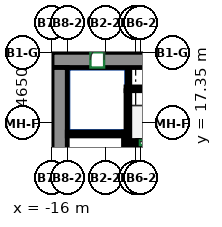
"""IFC4 building model, lengths in metres.
Left out: names, types, materials, properties, quantities, classifications, styles, units other than length and angle.
Written with IfcOpenShell. Run it as: python <this file> out.ifc"""

import sys

from ifc_helpers import new_model, si_unit, direction, frame, frame_2d, origin, place, context, subcontext, project, spatial, rectangle, extrude, source, transform, mapped, element, fill, save


model = new_model("IFC4")
c1 = context("Model", 3, precision=1e-05, world=origin(), true_north=direction((0.0, 1.0)))
c2 = subcontext(c1, "Body", "Model", "MODEL_VIEW")
j1 = project(units=[si_unit("LENGTHUNIT", "METRE"), si_unit("PLANEANGLEUNIT", "RADIAN")], contexts=[c1])
p1 = place(None, origin())
s1 = spatial("IfcSite", under=j1, at=p1, CompositionType="ELEMENT")
p2 = place(p1, origin())
s2 = spatial("IfcBuilding", under=s1, at=p2, CompositionType="ELEMENT")
p3 = place(p2, origin())
s3 = spatial("IfcBuildingStorey", under=s2, at=p3, CompositionType="ELEMENT", Elevation=0.0)
m1 = source(origin(), c2, "Body", "SweptSolid", [
    extrude(rectangle(XDim=34.1, YDim=1.0, at=frame_2d((17.05, 0.0))), origin(), (0.0, 0.0, 1.0), 8.6),
])
p4 = place(p3, frame((-16.0, 21.5, 0.0), z_axis=(0.0, 0.0, 1.0), x_axis=(1.0, 0.0, 0.0)))
e1 = element("IfcWall", 1, at=p4, inside=s3, PredefinedType="SHEAR", context=c2, shape_type="MappedRepresentation", body=[
    mapped(m1, transform((0.0, 0.0, 0.0))),
])
p5 = place(p4, frame((8.52, 0.0, 0.0)))
e2 = element("IfcOpeningElement", 2, at=p5, cuts=e1, PredefinedType="OPENING", context=c2, shape_type="SweptSolid", body=[
    extrude(rectangle(XDim=0.9, YDim=2.1, at=frame_2d((0.45, 1.05))), frame((0.0, 0.51, 0.0), z_axis=(0.0, -1.0, 0.0), x_axis=(1.0, 0.0, 0.0)), (0.0, 0.0, 1.0), 1.02),
])
p6 = place(p4, frame((14.55, 0.0, 0.0)))
e3 = element("IfcOpeningElement", 3, at=p6, cuts=e1, PredefinedType="OPENING", context=c2, shape_type="SweptSolid", body=[
    extrude(rectangle(XDim=0.9, YDim=2.1, at=frame_2d((0.45, 1.05))), frame((0.0, 0.51, 0.0), z_axis=(0.0, -1.0, 0.0), x_axis=(1.0, 0.0, 0.0)), (0.0, 0.0, 1.0), 1.02),
])
p7 = place(p4, frame((19.374, 0.0, 0.0)))
e4 = element("IfcOpeningElement", 4, at=p7, cuts=e1, PredefinedType="OPENING", context=c2, shape_type="SweptSolid", body=[
    extrude(rectangle(XDim=0.9, YDim=2.1, at=frame_2d((0.45, 1.05))), frame((0.0, 0.51, 0.0), z_axis=(0.0, -1.0, 0.0), x_axis=(1.0, 0.0, 0.0)), (0.0, 0.0, 1.0), 1.02),
])
p8 = place(p4, frame((25.404, 0.0, 0.0)))
e5 = element("IfcOpeningElement", 5, at=p8, cuts=e1, PredefinedType="OPENING", context=c2, shape_type="SweptSolid", body=[
    extrude(rectangle(XDim=0.9, YDim=2.1, at=frame_2d((0.45, 1.05))), frame((0.0, 0.51, 0.0), z_axis=(0.0, -1.0, 0.0), x_axis=(1.0, 0.0, 0.0)), (0.0, 0.0, 1.0), 1.02),
])
p9 = place(p4, frame((2.525, 0.0, 0.0)))
e6 = element("IfcOpeningElement", 6, at=p9, cuts=e1, PredefinedType="OPENING", context=c2, shape_type="SweptSolid", body=[
    extrude(rectangle(XDim=0.9, YDim=2.1, at=frame_2d((0.45, 1.05))), frame((0.0, 0.51, 0.0), z_axis=(0.0, -1.0, 0.0), x_axis=(1.0, 0.0, 0.0)), (0.0, 0.0, 1.0), 1.02),
])
p10 = place(p4, frame((30.675, 0.0, 0.0)))
e7 = element("IfcOpeningElement", 7, at=p10, cuts=e1, PredefinedType="OPENING", context=c2, shape_type="SweptSolid", body=[
    extrude(rectangle(XDim=0.9, YDim=2.1, at=frame_2d((0.45, 1.05))), frame((0.0, 0.51, 0.0), z_axis=(0.0, -1.0, 0.0), x_axis=(1.0, 0.0, 0.0)), (0.0, 0.0, 1.0), 1.02),
])
m2 = source(origin(), c2, "Body", "SweptSolid", [
    extrude(rectangle(XDim=12.0, YDim=1.0, at=frame_2d((6.0, 0.0))), origin(), (0.0, 0.0, 1.0), 8.6),
])
p11 = place(p3, frame((-15.5, 9.0, 0.0), z_axis=(0.0, 0.0, 1.0), x_axis=(0.0, 1.0, 0.0)))
e8 = element("IfcWall", 8, at=p11, inside=s3, PredefinedType="SHEAR", context=c2, shape_type="MappedRepresentation", body=[
    mapped(m2, transform((0.0, 0.0, 0.0))),
])
m3 = source(origin(), c2, "Body", "SweptSolid", [
    extrude(rectangle(XDim=7.75, YDim=0.25, at=frame_2d((3.875, 0.0))), origin(), (0.0, 0.0, 1.0), 8.6),
])
p12 = place(p3, frame((-11.175, 9.0, 0.0), z_axis=(0.0, 0.0, 1.0), x_axis=(0.0, 1.0, 0.0)))
e9 = element("IfcWall", 9, at=p12, inside=s3, PredefinedType="SHEAR", context=c2, shape_type="MappedRepresentation", body=[
    mapped(m3, transform((0.0, 0.0, 0.0))),
])
m4 = source(origin(), c2, "Body", "SweptSolid", [
    extrude(rectangle(XDim=3.7, YDim=0.25, at=frame_2d((1.85, 0.0))), origin(), (0.0, 0.0, 1.0), 8.6),
])
p13 = place(p3, frame((-15.0, 16.625, 0.0), z_axis=(0.0, 0.0, 1.0), x_axis=(1.0, 0.0, 0.0)))
e10 = element("IfcWall", 10, at=p13, inside=s3, PredefinedType="SHEAR", context=c2, shape_type="MappedRepresentation", body=[
    mapped(m4, transform((0.0, 0.0, 0.0))),
])
m5 = source(origin(), c2, "Body", "SweptSolid", [
    extrude(rectangle(XDim=0.64, YDim=0.3, at=frame_2d((0.32, 0.0))), origin(), (0.0, 0.0, 1.0), 8.6),
])
p14 = place(p3, frame((-11.01, 16.05, 0.0), z_axis=(0.0, 0.0, 1.0), x_axis=(1.0, 0.0, 0.0)))
e11 = element("IfcWall", 11, at=p14, inside=s3, PredefinedType="SHEAR", context=c2, shape_type="MappedRepresentation", body=[
    mapped(m5, transform((0.0, 0.0, 0.0))),
])
m6 = source(origin(), c2, "Body", "SweptSolid", [
    extrude(rectangle(XDim=1.4, YDim=0.3, at=frame_2d((0.7, 0.0))), origin(), (0.0, 0.0, 1.0), 8.6),
])
p15 = place(p3, frame((-10.37, 16.05, 0.0), z_axis=(0.0, 0.0, 1.0), x_axis=(1.0, 0.0, 0.0)))
e12 = element("IfcWall", 12, at=p15, inside=s3, PredefinedType="PARTITIONING", context=c2, shape_type="MappedRepresentation", body=[
    mapped(m6, transform((0.0, 0.0, 0.0))),
])
p16 = place(p15, frame((0.15, 0.0, 0.0)))
e13 = element("IfcOpeningElement", 13, at=p16, cuts=e12, PredefinedType="OPENING", context=c2, shape_type="SweptSolid", body=[
    extrude(rectangle(XDim=1.1, YDim=2.1, at=frame_2d((0.55, 1.05))), frame((0.0, 0.16, 0.0), z_axis=(0.0, -1.0, 0.0), x_axis=(1.0, 0.0, 0.0)), (0.0, 0.0, 1.0), 0.32),
])
m7 = source(origin(), c2, "Body", "SweptSolid", [
    extrude(rectangle(XDim=24.37, YDim=0.25, at=frame_2d((12.185, 0.0))), origin(), (0.0, 0.0, 1.0), 8.6),
])
p17 = place(p3, frame((-11.135, 19.6, 0.0), z_axis=(0.0, 0.0, 1.0), x_axis=(1.0, 0.0, 0.0)))
e14 = element("IfcWall", 14, at=p17, inside=s3, PredefinedType="PARTITIONING", context=c2, shape_type="MappedRepresentation", body=[
    mapped(m7, transform((0.0, 0.0, 0.0))),
])
m8 = source(origin(), c2, "Body", "SweptSolid", [
    extrude(rectangle(XDim=3.275, YDim=0.165, at=frame_2d((1.638, 0.0))), origin(), (0.0, 0.0, 1.0), 8.6),
])
p18 = place(p3, frame((-10.968, 16.2, 0.0), z_axis=(0.0, 0.0, 1.0), x_axis=(0.0, 1.0, 0.0)))
e15 = element("IfcWall", 15, at=p18, inside=s3, PredefinedType="PARTITIONING", context=c2, shape_type="MappedRepresentation", body=[
    mapped(m8, transform((0.0, 0.0, 0.0))),
])
m9 = source(origin(), c2, "Body", "SweptSolid", [
    extrude(rectangle(XDim=1.275, YDim=0.165, at=frame_2d((0.637, 0.0))), origin(), (0.0, 0.0, 1.0), 8.6),
])
p19 = place(p3, frame((-10.968, 19.725, 0.0), z_axis=(0.0, 0.0, 1.0), x_axis=(0.0, 1.0, 0.0)))
e16 = element("IfcWall", 16, at=p19, inside=s3, PredefinedType="PARTITIONING", context=c2, shape_type="MappedRepresentation", body=[
    mapped(m9, transform((0.0, 0.0, 0.0))),
])
m10 = source(origin(), c2, "Body", "SweptSolid", [
    extrude(rectangle(XDim=2.725, YDim=0.085, at=frame_2d((1.363, 0.0))), origin(), (0.0, 0.0, 1.0), 8.6),
])
p20 = place(p3, frame((-11.093, 16.75, 0.0), z_axis=(0.0, 0.0, 1.0), x_axis=(0.0, 1.0, 0.0)))
e17 = element("IfcWall", 17, at=p20, inside=s3, PredefinedType="PARTITIONING", context=c2, shape_type="MappedRepresentation", body=[
    mapped(m10, transform((0.0, 0.0, 0.0))),
])
p21 = place(p16, origin())
e18 = element("IfcDoor", 18, at=p21, inside=s3, OperationType="DOUBLE_DOOR_SLIDING", PredefinedType="DOOR", context=c2, shape_type="SweptSolid", body=[
    extrude(rectangle(XDim=1.1, YDim=2.1, at=frame_2d((0.55, 1.05))), frame((0.0, 0.025, 0.0), z_axis=(0.0, -1.0, 0.0), x_axis=(1.0, 0.0, 0.0)), (0.0, 0.0, 1.0), 0.05),
])
fill(e13, e18)
p22 = place(p9, origin())
e19 = element("IfcDoor", 19, at=p22, inside=s3, OperationType="SINGLE_SWING_RIGHT", PredefinedType="DOOR", context=c2, shape_type="SweptSolid", body=[
    extrude(rectangle(XDim=0.9, YDim=2.1, at=frame_2d((0.45, 1.05))), frame((0.0, -0.355, 0.0), z_axis=(0.0, -1.0, 0.0), x_axis=(1.0, 0.0, 0.0)), (0.0, 0.0, 1.0), 0.05),
])
fill(e6, e19)
save(model, sys.argv[1])
